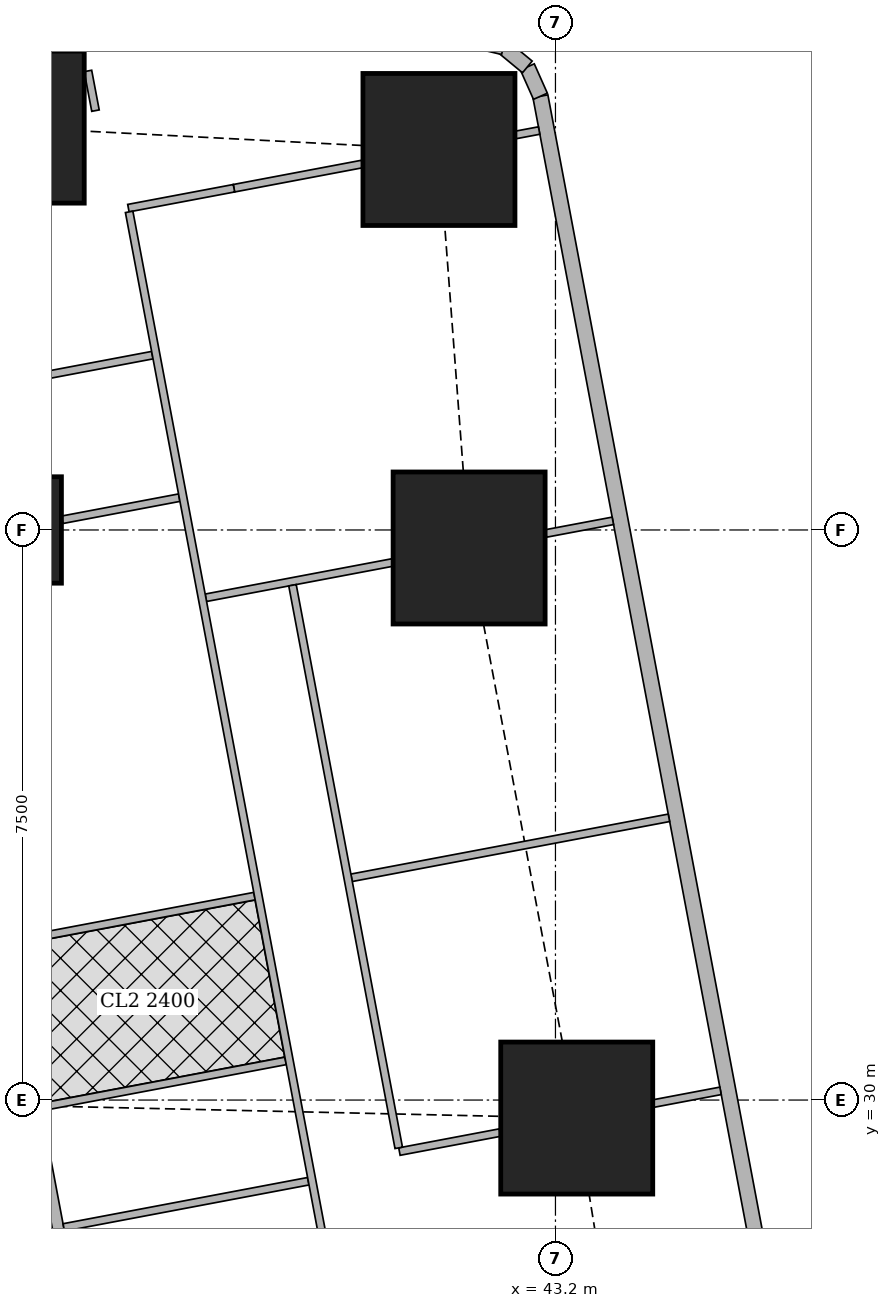
"""IFC4 building model, lengths in metres.
Left out: names, types, materials, properties, quantities, classifications, styles, units other than length and angle.
Written with IfcOpenShell. Run it as: python <this file> out.ifc"""

import sys

from ifc_helpers import new_model, si_unit, direction, frame, frame_2d, origin, origin_2d, place, context, subcontext, project, spatial, rectangle, extrude, element, fill, save


model = new_model("IFC4")
c1 = context("Model", 3, precision=1e-05, world=origin(), true_north=direction((0.0, 1.0)))
c2 = subcontext(c1, "Body", "Model", "MODEL_VIEW")
j1 = project(units=[si_unit("LENGTHUNIT", "METRE"), si_unit("PLANEANGLEUNIT", "RADIAN")], contexts=[c1])
p1 = place(None, origin())
s1 = spatial("IfcSite", under=j1, at=p1, CompositionType="ELEMENT")
p2 = place(p1, origin())
s2 = spatial("IfcBuilding", under=s1, at=p2, CompositionType="ELEMENT")
p3 = place(p2, frame((0.0, 0.0, 285.35)))
s3 = spatial("IfcBuildingStorey", under=s2, at=p3, CompositionType="ELEMENT", Elevation=285.35)
p4 = place(p3, frame((43.48, 29.763, 0.0), z_axis=(0.0, 0.0, 1.0), x_axis=(1.0, 0.0, 0.0)))
e1 = element("IfcColumn", 1, at=p4, inside=s3, PredefinedType="COLUMN", context=c2, shape_type="SweptSolid", body=[
    extrude(rectangle(XDim=2.0, YDim=2.0, at=origin_2d()), origin(), (0.0, 0.0, 1.0), 3.75),
])
p5 = place(p3, frame((36.0, 37.5, 0.0), z_axis=(0.0, 0.0, 1.0), x_axis=(1.0, 0.0, 0.0)))
e2 = element("IfcColumn", 2, at=p5, inside=s3, PredefinedType="COLUMN", context=c2, shape_type="SweptSolid", body=[
    extrude(rectangle(XDim=1.4, YDim=1.4, at=origin_2d()), origin(), (0.0, 0.0, 1.0), 3.75),
])
for number, where, z_axis, x_axis in (
    (3, (42.064, 37.263, 0.0), (0.0, 0.0, 1.0), (1.0, 0.0, 0.0)),
    (4, (36.0, 42.8, 0.0), (0.0, 0.0, 1.0), (1.0, 0.0, 0.0)),
    (5, (41.667, 42.506, 0.0), (0.0, 0.0, 1.0), (1.0, 0.0, 0.0)),
):
    element("IfcColumn", number, at=place(p3, frame(where, z_axis=z_axis, x_axis=x_axis)), inside=s3, PredefinedType="COLUMN", context=c2, shape_type="SweptSolid", body=[
        extrude(rectangle(XDim=2.0, YDim=2.0, at=origin_2d()), origin(), (0.0, 0.0, 1.0), 3.75),
    ])
p6 = place(p3, frame((49.684, 7.832, 0.0), z_axis=(0.0, 0.0, 1.0), x_axis=(-0.185616669694, 0.982622232565, 0.0)))
e6 = element("IfcWall", 6, at=p6, inside=s3, PredefinedType="SOLIDWALL", context=c2, shape_type="SweptSolid", body=[
    extrude(rectangle(XDim=36.0, YDim=0.2, at=frame_2d((18.0, 0.0))), origin(), (0.0, 0.0, 1.0), 3.5),
])
p7 = place(p6, frame((2.518, 0.0, 0.9)))
e7 = element("IfcOpeningElement", 7, at=p7, cuts=e6, PredefinedType="OPENING", context=c2, shape_type="SweptSolid", body=[
    extrude(rectangle(XDim=2.4, YDim=1.5, at=frame_2d((1.2, 0.75))), frame((0.0, 0.11, 0.0), z_axis=(0.0, -1.0, 0.0), x_axis=(1.0, 0.0, 0.0)), (0.0, 0.0, 1.0), 0.22),
])
p8 = place(p6, frame((8.444, 0.0, 0.9)))
e8 = element("IfcOpeningElement", 8, at=p8, cuts=e6, PredefinedType="OPENING", context=c2, shape_type="SweptSolid", body=[
    extrude(rectangle(XDim=1.8, YDim=1.5, at=frame_2d((0.9, 0.75))), frame((0.0, 0.11, 0.0), z_axis=(0.0, -1.0, 0.0), x_axis=(1.0, 0.0, 0.0)), (0.0, 0.0, 1.0), 0.22),
])
p9 = place(p6, frame((12.261, 0.0, 0.9)))
e9 = element("IfcOpeningElement", 9, at=p9, cuts=e6, PredefinedType="OPENING", context=c2, shape_type="SweptSolid", body=[
    extrude(rectangle(XDim=1.8, YDim=1.5, at=frame_2d((0.9, 0.75))), frame((0.0, 0.11, 0.0), z_axis=(0.0, -1.0, 0.0), x_axis=(1.0, 0.0, 0.0)), (0.0, 0.0, 1.0), 0.22),
])
p10 = place(p6, frame((16.078, 0.0, 0.9)))
e10 = element("IfcOpeningElement", 10, at=p10, cuts=e6, PredefinedType="OPENING", context=c2, shape_type="SweptSolid", body=[
    extrude(rectangle(XDim=1.8, YDim=1.5, at=frame_2d((0.9, 0.75))), frame((0.0, 0.11, 0.0), z_axis=(0.0, -1.0, 0.0), x_axis=(1.0, 0.0, 0.0)), (0.0, 0.0, 1.0), 0.22),
])
p11 = place(p6, frame((19.894, 0.0, 0.9)))
e11 = element("IfcOpeningElement", 11, at=p11, cuts=e6, PredefinedType="OPENING", context=c2, shape_type="SweptSolid", body=[
    extrude(rectangle(XDim=1.8, YDim=1.5, at=frame_2d((0.9, 0.75))), frame((0.0, 0.11, 0.0), z_axis=(0.0, -1.0, 0.0), x_axis=(1.0, 0.0, 0.0)), (0.0, 0.0, 1.0), 0.22),
])
p12 = place(p6, frame((23.71, 0.0, 0.9)))
e12 = element("IfcOpeningElement", 12, at=p12, cuts=e6, PredefinedType="OPENING", context=c2, shape_type="SweptSolid", body=[
    extrude(rectangle(XDim=1.8, YDim=1.5, at=frame_2d((0.9, 0.75))), frame((0.0, 0.11, 0.0), z_axis=(0.0, -1.0, 0.0), x_axis=(1.0, 0.0, 0.0)), (0.0, 0.0, 1.0), 0.22),
])
p13 = place(p6, frame((27.526, 0.0, 0.9)))
e13 = element("IfcOpeningElement", 13, at=p13, cuts=e6, PredefinedType="OPENING", context=c2, shape_type="SweptSolid", body=[
    extrude(rectangle(XDim=1.8, YDim=1.5, at=frame_2d((0.9, 0.75))), frame((0.0, 0.11, 0.0), z_axis=(0.0, -1.0, 0.0), x_axis=(1.0, 0.0, 0.0)), (0.0, 0.0, 1.0), 0.22),
])
p14 = place(p6, frame((32.046, 0.0, 0.9)))
e14 = element("IfcOpeningElement", 14, at=p14, cuts=e6, PredefinedType="OPENING", context=c2, shape_type="SweptSolid", body=[
    extrude(rectangle(XDim=1.8, YDim=1.5, at=frame_2d((0.9, 0.75))), frame((0.0, 0.11, 0.0), z_axis=(0.0, -1.0, 0.0), x_axis=(1.0, 0.0, 0.0)), (0.0, 0.0, 1.0), 0.22),
])
p15 = place(p3, frame((43.002, 43.206, 0.0), z_axis=(0.0, 0.0, 1.0), x_axis=(-0.40678170573, 0.913525393124, 0.0)))
e15 = element("IfcWall", 15, at=p15, inside=s3, PredefinedType="SOLIDWALL", context=c2, shape_type="SweptSolid", body=[
    extrude(rectangle(XDim=0.423, YDim=0.2, at=frame_2d((0.211, 0.0))), origin(), (0.0, 0.0, 1.0), 3.5),
])
p16 = place(p3, frame((42.83, 43.592, 0.0), z_axis=(0.0, 0.0, 1.0), x_axis=(-0.771190539797, 0.636604391539, 0.0)))
e16 = element("IfcWall", 16, at=p16, inside=s3, PredefinedType="SOLIDWALL", context=c2, shape_type="SweptSolid", body=[
    extrude(rectangle(XDim=0.41, YDim=0.2, at=frame_2d((0.205, 0.0))), origin(), (0.0, 0.0, 1.0), 3.5),
])
p17 = place(p3, frame((42.514, 43.853, 0.0), z_axis=(0.0, 0.0, 1.0), x_axis=(-0.973288080424, 0.229587265555, 0.0)))
e17 = element("IfcWall", 17, at=p17, inside=s3, PredefinedType="SOLIDWALL", context=c2, shape_type="SweptSolid", body=[
    extrude(rectangle(XDim=0.422, YDim=0.2, at=frame_2d((0.211, 0.0))), origin(), (0.0, 0.0, 1.0), 3.5),
])
p18 = place(p3, frame((34.036, 42.186, 0.0), z_axis=(0.0, 0.0, 1.0), x_axis=(0.185593518645, -0.9826266055, 0.0)))
e18 = element("IfcWall", 18, at=p18, inside=s3, PredefinedType="SOLIDWALL", context=c2, shape_type="SweptSolid", body=[
    extrude(rectangle(XDim=35.961, YDim=0.15, at=frame_2d((17.98, 0.0))), origin(), (0.0, 0.0, 1.0), 2.5),
])
p19 = place(p18, frame((19.345, 0.0, 0.0)))
e19 = element("IfcOpeningElement", 19, at=p19, cuts=e18, PredefinedType="OPENING", context=c2, shape_type="SweptSolid", body=[
    extrude(rectangle(XDim=1.0, YDim=2.1, at=frame_2d((0.5, 1.05))), frame((0.0, 0.085, 0.0), z_axis=(0.0, -1.0, 0.0), x_axis=(1.0, 0.0, 0.0)), (0.0, 0.0, 1.0), 0.17),
])
p20 = place(p18, frame((33.774, 0.0, 0.0)))
e20 = element("IfcOpeningElement", 20, at=p20, cuts=e18, PredefinedType="OPENING", context=c2, shape_type="SweptSolid", body=[
    extrude(rectangle(XDim=1.0, YDim=2.1, at=frame_2d((0.5, 1.05))), frame((0.0, 0.085, 0.0), z_axis=(0.0, -1.0, 0.0), x_axis=(1.0, 0.0, 0.0)), (0.0, 0.0, 1.0), 0.17),
])
p21 = place(p3, frame((37.049, 43.539, 0.0), z_axis=(0.0, 0.0, 1.0), x_axis=(0.186119495745, -0.982527115811, 0.0)))
e21 = element("IfcWall", 21, at=p21, inside=s3, PredefinedType="PARTITIONING", context=c2, shape_type="SweptSolid", body=[
    extrude(rectangle(XDim=0.531, YDim=0.1, at=frame_2d((0.266, 0.0))), origin(), (0.0, 0.0, 1.0), 2.05),
])
p22 = place(p3, frame((42.985, 42.755, 0.0), z_axis=(0.0, 0.0, 1.0), x_axis=(-0.98281924824, -0.184570651215, 0.0)))
e22 = element("IfcWall", 22, at=p22, inside=s3, PredefinedType="PARTITIONING", context=c2, shape_type="SweptSolid", body=[
    extrude(rectangle(XDim=0.313, YDim=0.1, at=frame_2d((0.157, 0.0))), origin(), (0.0, 0.0, 1.0), 3.5),
])
p23 = place(p3, frame((40.657, 42.315, 0.0), z_axis=(0.0, 0.0, 1.0), x_axis=(-0.982603924403, -0.185713563715, 0.0)))
e23 = element("IfcWall", 23, at=p23, inside=s3, PredefinedType="PARTITIONING", context=c2, shape_type="SweptSolid", body=[
    extrude(rectangle(XDim=1.717, YDim=0.1, at=frame_2d((0.858, 0.0))), origin(), (0.0, 0.0, 1.0), 2.05),
])
p24 = place(p3, frame((38.97, 41.996, 0.0), z_axis=(0.0, 0.0, 1.0), x_axis=(-0.982642648049, -0.185508561084, 0.0)))
e24 = element("IfcWall", 24, at=p24, inside=s3, PredefinedType="PARTITIONING", context=c2, shape_type="SweptSolid", body=[
    extrude(rectangle(XDim=1.413, YDim=0.1, at=frame_2d((0.707, 0.0))), origin(), (0.0, 0.0, 1.0), 3.5),
])
p25 = place(p24, frame((0.363, 0.0, 0.0)))
e25 = element("IfcOpeningElement", 25, at=p25, cuts=e24, PredefinedType="OPENING", context=c2, shape_type="SweptSolid", body=[
    extrude(rectangle(XDim=0.9, YDim=2.1, at=frame_2d((0.45, 1.05))), frame((0.0, 0.06, 0.0), z_axis=(0.0, -1.0, 0.0), x_axis=(1.0, 0.0, 0.0)), (0.0, 0.0, 1.0), 0.12),
])
p26 = place(p3, frame((43.955, 37.62, 0.0), z_axis=(0.0, 0.0, 1.0), x_axis=(-0.982708424405, -0.18515980288, 0.0)))
e26 = element("IfcWall", 26, at=p26, inside=s3, PredefinedType="PARTITIONING", context=c2, shape_type="SweptSolid", body=[
    extrude(rectangle(XDim=0.897, YDim=0.1, at=frame_2d((0.448, 0.0))), origin(), (0.0, 0.0, 1.0), 3.5),
])
p27 = place(p3, frame((41.054, 37.072, 0.0), z_axis=(0.0, 0.0, 1.0), x_axis=(-0.982579896219, -0.185840650951, 0.0)))
e27 = element("IfcWall", 27, at=p27, inside=s3, PredefinedType="PARTITIONING", context=c2, shape_type="SweptSolid", body=[
    extrude(rectangle(XDim=2.497, YDim=0.1, at=frame_2d((1.249, 0.0))), origin(), (0.0, 0.0, 1.0), 3.5),
])
p28 = place(p27, frame((1.447, 0.0, 0.0)))
e28 = element("IfcOpeningElement", 28, at=p28, cuts=e27, PredefinedType="OPENING", context=c2, shape_type="SweptSolid", body=[
    extrude(rectangle(XDim=0.9, YDim=2.1, at=frame_2d((0.45, 1.05))), frame((0.0, 0.06, 0.0), z_axis=(0.0, -1.0, 0.0), x_axis=(1.0, 0.0, 0.0)), (0.0, 0.0, 1.0), 0.12),
])
p29 = place(p3, frame((44.693, 33.713, 0.0), z_axis=(0.0, 0.0, 1.0), x_axis=(-0.982623519589, -0.185609856287, 0.0)))
e29 = element("IfcWall", 29, at=p29, inside=s3, PredefinedType="PARTITIONING", context=c2, shape_type="SweptSolid", body=[
    extrude(rectangle(XDim=4.25, YDim=0.1, at=frame_2d((2.125, 0.0))), origin(), (0.0, 0.0, 1.0), 2.5),
])
p30 = place(p3, frame((45.372, 30.121, 0.0), z_axis=(0.0, 0.0, 1.0), x_axis=(-0.982547416156, -0.186012297994, 0.0)))
e30 = element("IfcWall", 30, at=p30, inside=s3, PredefinedType="PARTITIONING", context=c2, shape_type="SweptSolid", body=[
    extrude(rectangle(XDim=0.898, YDim=0.1, at=frame_2d((0.449, 0.0))), origin(), (0.0, 0.0, 1.0), 3.5),
])
p31 = place(p3, frame((42.47, 29.572, 0.0), z_axis=(0.0, 0.0, 1.0), x_axis=(-0.982610503289, -0.185678751683, 0.0)))
e31 = element("IfcWall", 31, at=p31, inside=s3, PredefinedType="PARTITIONING", context=c2, shape_type="SweptSolid", body=[
    extrude(rectangle(XDim=1.346, YDim=0.1, at=frame_2d((0.673, 0.0))), origin(), (0.0, 0.0, 1.0), 2.5),
])
p32 = place(p3, frame((37.896, 39.8, 0.0), z_axis=(0.0, 0.0, 1.0), x_axis=(-0.982607026909, -0.185697147715, 0.0)))
e32 = element("IfcWall", 32, at=p32, inside=s3, PredefinedType="PARTITIONING", context=c2, shape_type="SweptSolid", body=[
    extrude(rectangle(XDim=3.275, YDim=0.1, at=frame_2d((1.637, 0.0))), origin(), (0.0, 0.0, 1.0), 3.5),
])
p33 = place(p3, frame((38.25, 37.925, 0.0), z_axis=(0.0, 0.0, 1.0), x_axis=(-0.982610209589, -0.185680305934, 0.0)))
e33 = element("IfcWall", 33, at=p33, inside=s3, PredefinedType="PARTITIONING", context=c2, shape_type="SweptSolid", body=[
    extrude(rectangle(XDim=1.567, YDim=0.1, at=frame_2d((0.784, 0.0))), origin(), (0.0, 0.0, 1.0), 3.5),
])
p34 = place(p3, frame((39.24, 32.683, 0.0), z_axis=(0.0, 0.0, 1.0), x_axis=(-0.982607026909, -0.185697147715, 0.0)))
e34 = element("IfcWall", 34, at=p34, inside=s3, PredefinedType="PARTITIONING", context=c2, shape_type="SweptSolid", body=[
    extrude(rectangle(XDim=3.275, YDim=0.1, at=frame_2d((1.637, 0.0))), origin(), (0.0, 0.0, 1.0), 3.5),
])
p35 = place(p3, frame((39.948, 28.932, 0.0), z_axis=(0.0, 0.0, 1.0), x_axis=(-0.982610347627, -0.185679575441, 0.0)))
e35 = element("IfcWall", 35, at=p35, inside=s3, PredefinedType="PARTITIONING", context=c2, shape_type="SweptSolid", body=[
    extrude(rectangle(XDim=3.274, YDim=0.1, at=frame_2d((1.637, 0.0))), origin(), (0.0, 0.0, 1.0), 3.5),
])
p36 = place(p3, frame((39.649, 30.515, 0.0), z_axis=(0.0, 0.0, 1.0), x_axis=(-0.982610347627, -0.185679575441, 0.0)))
e36 = element("IfcWall", 36, at=p36, inside=s3, PredefinedType="PARTITIONING", context=c2, shape_type="SweptSolid", body=[
    extrude(rectangle(XDim=3.274, YDim=0.1, at=frame_2d((1.637, 0.0))), origin(), (0.0, 0.0, 1.0), 2.5),
])
p37 = place(p3, frame((37.591, 41.685, 0.0), z_axis=(0.0, 0.0, 1.0), x_axis=(0.185541820726, -0.982636368532, 0.0)))
e37 = element("IfcWall", 37, at=p37, inside=s3, PredefinedType="PARTITIONING", context=c2, shape_type="SweptSolid", body=[
    extrude(rectangle(XDim=16.735, YDim=0.1, at=frame_2d((8.367, 0.0))), origin(), (0.0, 0.0, 1.0), 2.5),
])
p38 = place(p37, frame((2.413, 0.0, 0.0)))
e38 = element("IfcOpeningElement", 38, at=p38, cuts=e37, PredefinedType="OPENING", context=c2, shape_type="SweptSolid", body=[
    extrude(rectangle(XDim=0.9, YDim=2.1, at=frame_2d((0.45, 1.05))), frame((0.0, 0.06, 0.0), z_axis=(0.0, -1.0, 0.0), x_axis=(1.0, 0.0, 0.0)), (0.0, 0.0, 1.0), 0.12),
])
p39 = place(p37, frame((6.713, 0.0, 0.0)))
e39 = element("IfcOpeningElement", 39, at=p39, cuts=e37, PredefinedType="OPENING", context=c2, shape_type="SweptSolid", body=[
    extrude(rectangle(XDim=0.9, YDim=2.1, at=frame_2d((0.45, 1.05))), frame((0.0, 0.06, 0.0), z_axis=(0.0, -1.0, 0.0), x_axis=(1.0, 0.0, 0.0)), (0.0, 0.0, 1.0), 0.12),
])
p40 = place(p37, frame((9.805, 0.0, 0.0)))
e40 = element("IfcOpeningElement", 40, at=p40, cuts=e37, PredefinedType="OPENING", context=c2, shape_type="SweptSolid", body=[
    extrude(rectangle(XDim=0.9, YDim=2.1, at=frame_2d((0.45, 1.05))), frame((0.0, 0.06, 0.0), z_axis=(0.0, -1.0, 0.0), x_axis=(1.0, 0.0, 0.0)), (0.0, 0.0, 1.0), 0.12),
])
p41 = place(p37, frame((11.713, 0.0, 0.0)))
e41 = element("IfcOpeningElement", 41, at=p41, cuts=e37, PredefinedType="OPENING", context=c2, shape_type="SweptSolid", body=[
    extrude(rectangle(XDim=0.9, YDim=2.1, at=frame_2d((0.45, 1.05))), frame((0.0, 0.06, 0.0), z_axis=(0.0, -1.0, 0.0), x_axis=(1.0, 0.0, 0.0)), (0.0, 0.0, 1.0), 0.12),
])
p42 = place(p37, frame((14.426, 0.0, 0.0)))
e42 = element("IfcOpeningElement", 42, at=p42, cuts=e37, PredefinedType="OPENING", context=c2, shape_type="SweptSolid", body=[
    extrude(rectangle(XDim=0.9, YDim=2.1, at=frame_2d((0.45, 1.05))), frame((0.0, 0.06, 0.0), z_axis=(0.0, -1.0, 0.0), x_axis=(1.0, 0.0, 0.0)), (0.0, 0.0, 1.0), 0.12),
])
p43 = place(p3, frame((39.74, 36.773, 0.0), z_axis=(0.0, 0.0, 1.0), x_axis=(0.185583825641, -0.982628436216, 0.0)))
e43 = element("IfcWall", 43, at=p43, inside=s3, PredefinedType="PARTITIONING", context=c2, shape_type="SweptSolid", body=[
    extrude(rectangle(XDim=7.533, YDim=0.1, at=frame_2d((3.766, 0.0))), origin(), (0.0, 0.0, 1.0), 2.5),
])
p44 = place(p43, frame((2.726, 0.0, 0.0)))
e44 = element("IfcOpeningElement", 44, at=p44, cuts=e43, PredefinedType="OPENING", context=c2, shape_type="SweptSolid", body=[
    extrude(rectangle(XDim=0.9, YDim=2.1, at=frame_2d((0.45, 1.05))), frame((0.0, 0.06, 0.0), z_axis=(0.0, -1.0, 0.0), x_axis=(1.0, 0.0, 0.0)), (0.0, 0.0, 1.0), 0.12),
])
p45 = place(p43, frame((6.383, 0.0, 0.0)))
e45 = element("IfcOpeningElement", 45, at=p45, cuts=e43, PredefinedType="OPENING", context=c2, shape_type="SweptSolid", body=[
    extrude(rectangle(XDim=0.9, YDim=2.1, at=frame_2d((0.45, 1.05))), frame((0.0, 0.06, 0.0), z_axis=(0.0, -1.0, 0.0), x_axis=(1.0, 0.0, 0.0)), (0.0, 0.0, 1.0), 0.12),
])
p46 = place(p11, origin())
e46 = element("IfcWindow", 46, at=p46, inside=s3, PartitioningType="SINGLE_PANEL", PredefinedType="WINDOW", context=c2, shape_type="SweptSolid", body=[
    extrude(rectangle(XDim=1.8, YDim=1.5, at=frame_2d((0.9, 0.75))), frame((0.0, 0.03, 0.0), z_axis=(0.0, -1.0, 0.0), x_axis=(1.0, 0.0, 0.0)), (0.0, 0.0, 1.0), 0.06),
])
fill(e11, e46)
p47 = place(p12, origin())
e47 = element("IfcWindow", 47, at=p47, inside=s3, PartitioningType="SINGLE_PANEL", PredefinedType="WINDOW", context=c2, shape_type="SweptSolid", body=[
    extrude(rectangle(XDim=1.8, YDim=1.5, at=frame_2d((0.9, 0.75))), frame((0.0, 0.03, 0.0), z_axis=(0.0, -1.0, 0.0), x_axis=(1.0, 0.0, 0.0)), (0.0, 0.0, 1.0), 0.06),
])
fill(e12, e47)
p48 = place(p13, origin())
e48 = element("IfcWindow", 48, at=p48, inside=s3, PartitioningType="SINGLE_PANEL", PredefinedType="WINDOW", context=c2, shape_type="SweptSolid", body=[
    extrude(rectangle(XDim=1.8, YDim=1.5, at=frame_2d((0.9, 0.75))), frame((0.0, 0.03, 0.0), z_axis=(0.0, -1.0, 0.0), x_axis=(1.0, 0.0, 0.0)), (0.0, 0.0, 1.0), 0.06),
])
fill(e13, e48)
p49 = place(p14, origin())
e49 = element("IfcWindow", 49, at=p49, inside=s3, PartitioningType="SINGLE_PANEL", PredefinedType="WINDOW", context=c2, shape_type="SweptSolid", body=[
    extrude(rectangle(XDim=1.8, YDim=1.5, at=frame_2d((0.9, 0.75))), frame((0.0, 0.03, 0.0), z_axis=(0.0, -1.0, 0.0), x_axis=(1.0, 0.0, 0.0)), (0.0, 0.0, 1.0), 0.06),
])
fill(e14, e49)
p50 = place(p28, origin())
e50 = element("IfcDoor", 50, at=p50, inside=s3, OperationType="SINGLE_SWING_LEFT", PredefinedType="DOOR", context=c2, shape_type="SweptSolid", body=[
    extrude(rectangle(XDim=0.9, YDim=2.1, at=frame_2d((0.45, 1.05))), frame((0.0, 0.025, 0.0), z_axis=(0.0, -1.0, 0.0), x_axis=(1.0, 0.0, 0.0)), (0.0, 0.0, 1.0), 0.05),
])
fill(e28, e50)
p51 = place(p25, origin())
e51 = element("IfcDoor", 51, at=p51, inside=s3, OperationType="SINGLE_SWING_LEFT", PredefinedType="DOOR", context=c2, shape_type="SweptSolid", body=[
    extrude(rectangle(XDim=0.9, YDim=2.1, at=frame_2d((0.45, 1.05))), frame((0.0, 0.025, 0.0), z_axis=(0.0, -1.0, 0.0), x_axis=(1.0, 0.0, 0.0)), (0.0, 0.0, 1.0), 0.05),
])
fill(e25, e51)
p52 = place(p38, origin())
e52 = element("IfcDoor", 52, at=p52, inside=s3, OperationType="SINGLE_SWING_LEFT", PredefinedType="DOOR", context=c2, shape_type="SweptSolid", body=[
    extrude(rectangle(XDim=0.9, YDim=2.1, at=frame_2d((0.45, 1.05))), frame((0.0, 0.025, 0.0), z_axis=(0.0, -1.0, 0.0), x_axis=(1.0, 0.0, 0.0)), (0.0, 0.0, 1.0), 0.05),
])
fill(e38, e52)
p53 = place(p39, origin())
e53 = element("IfcDoor", 53, at=p53, inside=s3, OperationType="SINGLE_SWING_LEFT", PredefinedType="DOOR", context=c2, shape_type="SweptSolid", body=[
    extrude(rectangle(XDim=0.9, YDim=2.1, at=frame_2d((0.45, 1.05))), frame((0.0, 0.025, 0.0), z_axis=(0.0, -1.0, 0.0), x_axis=(1.0, 0.0, 0.0)), (0.0, 0.0, 1.0), 0.05),
])
fill(e39, e53)
p54 = place(p40, origin())
e54 = element("IfcDoor", 54, at=p54, inside=s3, OperationType="SINGLE_SWING_LEFT", PredefinedType="DOOR", context=c2, shape_type="SweptSolid", body=[
    extrude(rectangle(XDim=0.9, YDim=2.1, at=frame_2d((0.45, 1.05))), frame((0.0, 0.025, 0.0), z_axis=(0.0, -1.0, 0.0), x_axis=(1.0, 0.0, 0.0)), (0.0, 0.0, 1.0), 0.05),
])
fill(e40, e54)
p55 = place(p41, origin())
e55 = element("IfcDoor", 55, at=p55, inside=s3, OperationType="SINGLE_SWING_RIGHT", PredefinedType="DOOR", context=c2, shape_type="SweptSolid", body=[
    extrude(rectangle(XDim=0.9, YDim=2.1, at=frame_2d((0.45, 1.05))), frame((0.0, 0.025, 0.0), z_axis=(0.0, -1.0, 0.0), x_axis=(1.0, 0.0, 0.0)), (0.0, 0.0, 1.0), 0.05),
])
fill(e41, e55)
p56 = place(p44, origin())
e56 = element("IfcDoor", 56, at=p56, inside=s3, OperationType="SINGLE_SWING_RIGHT", PredefinedType="DOOR", context=c2, shape_type="SweptSolid", body=[
    extrude(rectangle(XDim=0.9, YDim=2.1, at=frame_2d((0.45, 1.05))), frame((0.0, 0.025, 0.0), z_axis=(0.0, -1.0, 0.0), x_axis=(1.0, 0.0, 0.0)), (0.0, 0.0, 1.0), 0.05),
])
fill(e44, e56)
p57 = place(p45, origin())
e57 = element("IfcDoor", 57, at=p57, inside=s3, OperationType="SINGLE_SWING_RIGHT", PredefinedType="DOOR", context=c2, shape_type="SweptSolid", body=[
    extrude(rectangle(XDim=0.9, YDim=2.1, at=frame_2d((0.45, 1.05))), frame((0.0, 0.025, 0.0), z_axis=(0.0, -1.0, 0.0), x_axis=(1.0, 0.0, 0.0)), (0.0, 0.0, 1.0), 0.05),
])
fill(e45, e57)
save(model, sys.argv[1])
